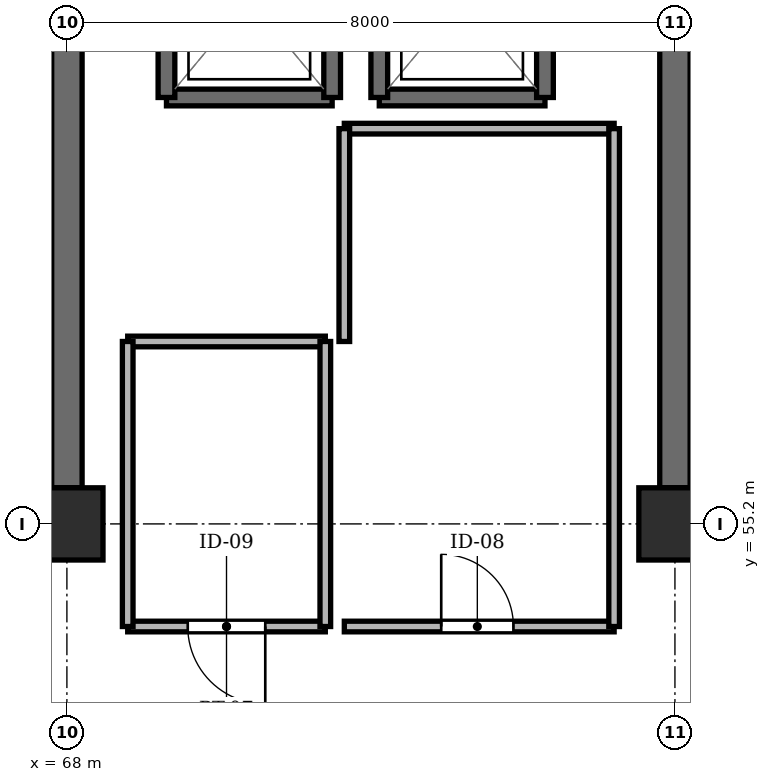
"""IFC4 building model, lengths in metres.
Left out: names, types, materials, properties, quantities, classifications, styles, units other than length and angle.
Written with IfcOpenShell. Run it as: python <this file> out.ifc"""

import sys

from ifc_helpers import new_model, si_unit, direction, frame, frame_2d, origin, origin_2d, place, context, subcontext, project, spatial, rectangle, extrude, element, fill, save


model = new_model("IFC4")
c1 = context("Model", 3, precision=1e-05, world=origin(), true_north=direction((0.0, 1.0)))
c2 = subcontext(c1, "Body", "Model", "MODEL_VIEW")
j1 = project(units=[si_unit("LENGTHUNIT", "METRE"), si_unit("PLANEANGLEUNIT", "RADIAN")], contexts=[c1])
p1 = place(None, origin())
s1 = spatial("IfcSite", under=j1, at=p1, CompositionType="ELEMENT")
p2 = place(p1, origin())
s2 = spatial("IfcBuilding", under=s1, at=p2, CompositionType="ELEMENT")
p3 = place(p2, frame((0.0, 0.0, 43.8)))
s3 = spatial("IfcBuildingStorey", under=s2, at=p3, CompositionType="ELEMENT", Elevation=43.8)
for number, where, z_axis, x_axis in (
    (1, (68.0, 55.2, -0.24), (0.0, 0.0, 1.0), (1.0, 0.0, 0.0)),
    (2, (76.0, 55.2, -0.24), (0.0, 0.0, 1.0), (1.0, 0.0, 0.0)),
):
    element("IfcColumn", number, at=place(p3, frame(where, z_axis=z_axis, x_axis=x_axis)), inside=s3, PredefinedType="COLUMN", context=c2, shape_type="SweptSolid", body=[
        extrude(rectangle(XDim=0.95, YDim=0.95, at=origin_2d()), origin(), (0.0, 0.0, 1.0), 3.26),
    ])
for number, where, z_axis, x_axis in (
    (3, (68.0, 55.675, 0.0), (0.0, 0.0, 1.0), (0.0, 1.0, 0.0)),
    (4, (76.0, 55.675, 0.0), (0.0, 0.0, 1.0), (0.0, 1.0, 0.0)),
):
    element("IfcWall", number, at=place(p3, frame(where, z_axis=z_axis, x_axis=x_axis)), inside=s3, PredefinedType="SHEAR", context=c2, shape_type="SweptSolid", body=[
        extrude(rectangle(XDim=6.325, YDim=0.4, at=frame_2d((3.163, 0.0))), origin(), (0.0, 0.0, 1.0), 3.02),
    ])
p4 = place(p3, frame((69.31, 60.81, 0.0), z_axis=(0.0, 0.0, 1.0), x_axis=(1.0, 0.0, 0.0)))
e5 = element("IfcWall", 5, at=p4, inside=s3, PredefinedType="SHEAR", context=c2, shape_type="SweptSolid", body=[
    extrude(rectangle(XDim=2.18, YDim=0.22, at=frame_2d((1.09, 0.0))), origin(), (0.0, 0.0, 1.0), 3.02),
])
for number, where, z_axis, x_axis in (
    (6, (69.31, 63.39, 0.0), (0.0, 0.0, 1.0), (0.0, -1.0, 0.0)),
    (7, (71.49, 60.81, 0.0), (0.0, 0.0, 1.0), (0.0, 1.0, 0.0)),
):
    element("IfcWall", number, at=place(p3, frame(where, z_axis=z_axis, x_axis=x_axis)), inside=s3, PredefinedType="SHEAR", context=c2, shape_type="SweptSolid", body=[
        extrude(rectangle(XDim=2.58, YDim=0.22, at=frame_2d((1.29, 0.0))), origin(), (0.0, 0.0, 1.0), 3.02),
    ])
p5 = place(p3, frame((72.11, 60.81, 0.0), z_axis=(0.0, 0.0, 1.0), x_axis=(1.0, 0.0, 0.0)))
e8 = element("IfcWall", 8, at=p5, inside=s3, PredefinedType="SHEAR", context=c2, shape_type="SweptSolid", body=[
    extrude(rectangle(XDim=2.18, YDim=0.22, at=frame_2d((1.09, 0.0))), origin(), (0.0, 0.0, 1.0), 3.02),
])
for number, where, z_axis, x_axis in (
    (9, (72.11, 63.39, 0.0), (0.0, 0.0, 1.0), (0.0, -1.0, 0.0)),
    (10, (74.29, 60.81, 0.0), (0.0, 0.0, 1.0), (0.0, 1.0, 0.0)),
):
    element("IfcWall", number, at=place(p3, frame(where, z_axis=z_axis, x_axis=x_axis)), inside=s3, PredefinedType="SHEAR", context=c2, shape_type="SweptSolid", body=[
        extrude(rectangle(XDim=2.58, YDim=0.22, at=frame_2d((1.29, 0.0))), origin(), (0.0, 0.0, 1.0), 3.02),
    ])
p6 = place(p3, frame((68.8, 53.85, 0.0), z_axis=(0.0, 0.0, 1.0), x_axis=(1.0, 0.0, 0.0)))
e11 = element("IfcWall", 11, at=p6, inside=s3, PredefinedType="PARTITIONING", context=c2, shape_type="SweptSolid", body=[
    extrude(rectangle(XDim=2.6, YDim=0.14, at=frame_2d((1.3, 0.0))), origin(), (0.0, 0.0, 1.0), 2.53),
])
p7 = place(p6, frame((0.79, 0.0, 0.0)))
e12 = element("IfcOpeningElement", 12, at=p7, cuts=e11, PredefinedType="OPENING", context=c2, shape_type="SweptSolid", body=[
    extrude(rectangle(XDim=1.02, YDim=2.1, at=frame_2d((0.51, 1.05))), frame((0.0, 0.082, 0.0), z_axis=(0.0, -1.0, 0.0), x_axis=(1.0, 0.0, 0.0)), (0.0, 0.0, 1.0), 0.164),
])
p8 = place(p3, frame((68.8, 57.6, 0.0), z_axis=(0.0, 0.0, 1.0), x_axis=(1.0, 0.0, 0.0)))
e13 = element("IfcWall", 13, at=p8, inside=s3, PredefinedType="PARTITIONING", context=c2, shape_type="SweptSolid", body=[
    extrude(rectangle(XDim=2.6, YDim=0.14, at=frame_2d((1.3, 0.0))), origin(), (0.0, 0.0, 1.0), 2.53),
])
for number, where, z_axis, x_axis in (
    (14, (68.8, 53.85, 0.0), (0.0, 0.0, 1.0), (0.0, 1.0, 0.0)),
    (15, (71.4, 53.85, 0.0), (0.0, 0.0, 1.0), (0.0, 1.0, 0.0)),
):
    element("IfcWall", number, at=place(p3, frame(where, z_axis=z_axis, x_axis=x_axis)), inside=s3, PredefinedType="PARTITIONING", context=c2, shape_type="SweptSolid", body=[
        extrude(rectangle(XDim=3.75, YDim=0.14, at=frame_2d((1.875, 0.0))), origin(), (0.0, 0.0, 1.0), 2.53),
    ])
p9 = place(p3, frame((71.65, 53.85, 0.0), z_axis=(0.0, 0.0, 1.0), x_axis=(1.0, 0.0, 0.0)))
e16 = element("IfcWall", 16, at=p9, inside=s3, PredefinedType="PARTITIONING", context=c2, shape_type="SweptSolid", body=[
    extrude(rectangle(XDim=3.55, YDim=0.14, at=frame_2d((1.775, 0.0))), origin(), (0.0, 0.0, 1.0), 2.53),
])
p10 = place(p9, frame((1.275, 0.0, 0.0)))
e17 = element("IfcOpeningElement", 17, at=p10, cuts=e16, PredefinedType="OPENING", context=c2, shape_type="SweptSolid", body=[
    extrude(rectangle(XDim=0.95, YDim=2.1, at=frame_2d((0.475, 1.05))), frame((0.0, 0.082, 0.0), z_axis=(0.0, -1.0, 0.0), x_axis=(1.0, 0.0, 0.0)), (0.0, 0.0, 1.0), 0.164),
])
p11 = place(p3, frame((71.65, 60.4, 0.0), z_axis=(0.0, 0.0, 1.0), x_axis=(1.0, 0.0, 0.0)))
e18 = element("IfcWall", 18, at=p11, inside=s3, PredefinedType="PARTITIONING", context=c2, shape_type="SweptSolid", body=[
    extrude(rectangle(XDim=3.55, YDim=0.14, at=frame_2d((1.775, 0.0))), origin(), (0.0, 0.0, 1.0), 2.53),
])
p12 = place(p3, frame((71.65, 57.6, 0.0), z_axis=(0.0, 0.0, 1.0), x_axis=(0.0, 1.0, 0.0)))
e19 = element("IfcWall", 19, at=p12, inside=s3, PredefinedType="PARTITIONING", context=c2, shape_type="SweptSolid", body=[
    extrude(rectangle(XDim=2.8, YDim=0.14, at=frame_2d((1.4, 0.0))), origin(), (0.0, 0.0, 1.0), 2.53),
])
p13 = place(p3, frame((75.2, 53.85, 0.0), z_axis=(0.0, 0.0, 1.0), x_axis=(0.0, 1.0, 0.0)))
e20 = element("IfcWall", 20, at=p13, inside=s3, PredefinedType="PARTITIONING", context=c2, shape_type="SweptSolid", body=[
    extrude(rectangle(XDim=6.55, YDim=0.14, at=frame_2d((3.275, 0.0))), origin(), (0.0, 0.0, 1.0), 2.53),
])
p14 = place(p7, frame((1.02, 0.0, 0.0), z_axis=(0.0, 0.0, 1.0), x_axis=(-1.0, 0.0, 0.0)))
e21 = element("IfcDoor", 21, at=p14, inside=s3, OperationType="SINGLE_SWING_RIGHT", PredefinedType="DOOR", context=c2, shape_type="SweptSolid", body=[
    extrude(rectangle(XDim=1.02, YDim=2.1, at=frame_2d((0.51, 1.05))), frame((0.0, 0.025, 0.0), z_axis=(0.0, -1.0, 0.0), x_axis=(1.0, 0.0, 0.0)), (0.0, 0.0, 1.0), 0.05),
])
fill(e12, e21)
p15 = place(p10, origin())
e22 = element("IfcDoor", 22, at=p15, inside=s3, OperationType="SINGLE_SWING_LEFT", PredefinedType="DOOR", context=c2, shape_type="SweptSolid", body=[
    extrude(rectangle(XDim=0.95, YDim=2.1, at=frame_2d((0.475, 1.05))), frame((0.0, 0.025, 0.0), z_axis=(0.0, -1.0, 0.0), x_axis=(1.0, 0.0, 0.0)), (0.0, 0.0, 1.0), 0.05),
])
fill(e17, e22)
save(model, sys.argv[1])
